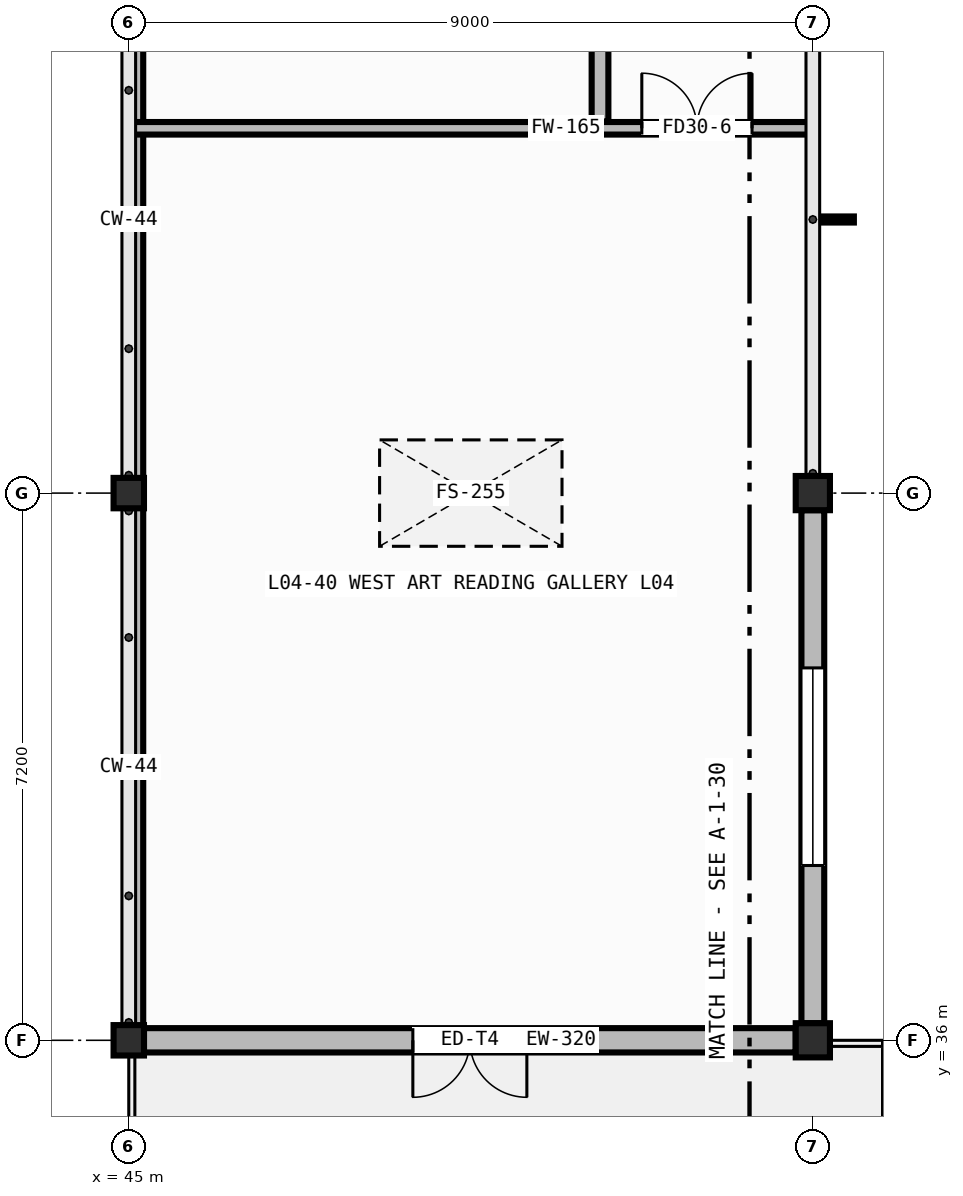
"""IFC4 building model, lengths in metres.
Left out: names, types, materials, properties, quantities, classifications, styles, units other than length and angle.
Written with IfcOpenShell. Run it as: python <this file> out.ifc"""

import sys

from ifc_helpers import new_model, si_unit, direction, frame, frame_2d, origin, origin_2d, place, context, subcontext, project, spatial, rectangle, hollow_rectangle, extrude, element, fill, save


model = new_model("IFC4")
c1 = context("Model", 3, precision=1e-05, world=origin(), true_north=direction((0.0, 1.0)))
c2 = subcontext(c1, "Body", "Model", "MODEL_VIEW")
j1 = project(units=[si_unit("LENGTHUNIT", "METRE"), si_unit("PLANEANGLEUNIT", "RADIAN")], contexts=[c1])
p1 = place(None, origin())
s1 = spatial("IfcSite", under=j1, at=p1, CompositionType="ELEMENT")
p2 = place(p1, origin())
s2 = spatial("IfcBuilding", under=s1, at=p2, CompositionType="ELEMENT")
p3 = place(p2, frame((0.0, 0.0, 12.8)))
s3 = spatial("IfcBuildingStorey", under=s2, at=p3, CompositionType="ELEMENT", Elevation=12.8)
for number, where, z_axis, x_axis in (
    (1, (45.0, 36.0, 0.0), (0.0, 0.0, 1.0), (1.0, 0.0, 0.0)),
    (2, (45.0, 43.2, 0.0), (0.0, 0.0, 1.0), (1.0, 0.0, 0.0)),
):
    element("IfcColumn", number, at=place(p3, frame(where, z_axis=z_axis, x_axis=x_axis)), inside=s3, PredefinedType="COLUMN", context=c2, shape_type="SweptSolid", body=[
        extrude(hollow_rectangle(XDim=0.4, YDim=0.4, WallThickness=0.016, at=origin_2d()), origin(), (0.0, 0.0, 1.0), 3.78),
    ])
for number, where, z_axis, x_axis in (
    (3, (54.0, 36.0, 0.0), (0.0, 0.0, 1.0), (1.0, 0.0, 0.0)),
    (4, (54.0, 43.2, 0.0), (0.0, 0.0, 1.0), (1.0, 0.0, 0.0)),
):
    element("IfcColumn", number, at=place(p3, frame(where, z_axis=z_axis, x_axis=x_axis)), inside=s3, PredefinedType="COLUMN", context=c2, shape_type="SweptSolid", body=[
        extrude(hollow_rectangle(XDim=0.45, YDim=0.45, WallThickness=0.019, at=origin_2d()), origin(), (0.0, 0.0, 1.0), 3.78),
    ])
p4 = place(p3, frame((45.2, 36.0, 0.0), z_axis=(0.0, 0.0, 1.0), x_axis=(1.0, 0.0, 0.0)))
e5 = element("IfcWall", 5, at=p4, inside=s3, PredefinedType="STANDARD", context=c2, shape_type="SweptSolid", body=[
    extrude(rectangle(XDim=8.575, YDim=0.32, at=frame_2d((4.288, 0.0))), origin(), (0.0, 0.0, 1.0), 3.33),
])
p5 = place(p4, frame((3.538, 0.0, 0.0)))
e6 = element("IfcOpeningElement", 6, at=p5, cuts=e5, PredefinedType="OPENING", context=c2, shape_type="SweptSolid", body=[
    extrude(rectangle(XDim=1.5, YDim=2.05, at=frame_2d((0.75, 1.025))), frame((0.0, 0.172, 0.0), z_axis=(0.0, -1.0, 0.0), x_axis=(1.0, 0.0, 0.0)), (0.0, 0.0, 1.0), 0.344),
])
p6 = place(p3, frame((54.0, 42.975, 0.0), z_axis=(0.0, 0.0, 1.0), x_axis=(0.0, -1.0, 0.0)))
e7 = element("IfcWall", 7, at=p6, inside=s3, PredefinedType="STANDARD", context=c2, shape_type="SweptSolid", body=[
    extrude(rectangle(XDim=6.75, YDim=0.3, at=frame_2d((3.375, 0.0))), origin(), (0.0, 0.0, 1.0), 3.33),
])
p7 = place(p6, frame((2.075, 0.0, 0.85)))
e8 = element("IfcOpeningElement", 8, at=p7, cuts=e7, PredefinedType="OPENING", context=c2, shape_type="SweptSolid", body=[
    extrude(rectangle(XDim=2.6, YDim=1.6, at=frame_2d((1.3, 0.8))), frame((0.0, 0.162, 0.0), z_axis=(0.0, -1.0, 0.0), x_axis=(1.0, 0.0, 0.0)), (0.0, 0.0, 1.0), 0.324),
])
p8 = place(p3, frame((45.095, 36.0, 4.0), z_axis=(0.0, 0.0, 1.0), x_axis=(0.0, 1.0, 0.0)))
e9 = element("IfcWall", 9, at=p8, inside=s3, PredefinedType="PARAPET", context=c2, shape_type="SweptSolid", body=[
    extrude(rectangle(XDim=28.8, YDim=0.19, at=frame_2d((14.4, 0.0))), origin(), (0.0, 0.0, 1.0), 0.75),
])
p9 = place(p3, frame((45.035, 48.0, 0.0), z_axis=(0.0, 0.0, 1.0), x_axis=(1.0, 0.0, 0.0)))
e10 = element("IfcWall", 10, at=p9, inside=s3, PredefinedType="PARTITIONING", context=c2, shape_type="SweptSolid", body=[
    extrude(rectangle(XDim=8.93, YDim=0.165, at=frame_2d((4.465, 0.0))), origin(), (0.0, 0.0, 1.0), 3.78),
])
p10 = place(p9, frame((6.715, 0.0, 0.0)))
e11 = element("IfcOpeningElement", 11, at=p10, cuts=e10, PredefinedType="OPENING", context=c2, shape_type="SweptSolid", body=[
    extrude(rectangle(XDim=1.45, YDim=2.1, at=frame_2d((0.725, 1.05))), frame((0.0, 0.094, 0.0), z_axis=(0.0, -1.0, 0.0), x_axis=(1.0, 0.0, 0.0)), (0.0, 0.0, 1.0), 0.189),
])
p11 = place(p3, frame((51.2, 48.09, 0.0), z_axis=(0.0, 0.0, 1.0), x_axis=(0.0, 1.0, 0.0)))
e12 = element("IfcWall", 12, at=p11, inside=s3, PredefinedType="PARTITIONING", context=c2, shape_type="SweptSolid", body=[
    extrude(rectangle(XDim=21.02, YDim=0.22, at=frame_2d((10.51, 0.0))), origin(), (0.0, 0.0, 1.0), 3.78),
])
p12 = place(p11, frame((5.11, 0.0, 0.0)))
e13 = element("IfcOpeningElement", 13, at=p12, cuts=e12, PredefinedType="OPENING", context=c2, shape_type="SweptSolid", body=[
    extrude(rectangle(XDim=1.6, YDim=2.12, at=frame_2d((0.8, 1.06))), frame((0.0, 0.122, 0.0), z_axis=(0.0, -1.0, 0.0), x_axis=(1.0, 0.0, 0.0)), (0.0, 0.0, 1.0), 0.244),
])
p13 = place(p5, frame((1.5, 0.0, 0.0), z_axis=(0.0, 0.0, 1.0), x_axis=(-1.0, 0.0, 0.0)))
e14 = element("IfcDoor", 14, at=p13, inside=s3, OperationType="DOUBLE_DOOR_SINGLE_SWING", PredefinedType="DOOR", context=c2, shape_type="SweptSolid", body=[
    extrude(rectangle(XDim=1.5, YDim=2.05, at=frame_2d((0.75, 1.025))), frame((0.0, 0.025, 0.0), z_axis=(0.0, -1.0, 0.0), x_axis=(1.0, 0.0, 0.0)), (0.0, 0.0, 1.0), 0.05),
])
fill(e6, e14)
p14 = place(p7, origin())
e15 = element("IfcWindow", 15, at=p14, inside=s3, PartitioningType="DOUBLE_PANEL_VERTICAL", PredefinedType="WINDOW", context=c2, shape_type="SweptSolid", body=[
    extrude(rectangle(XDim=2.6, YDim=1.6, at=frame_2d((1.3, 0.8))), frame((0.0, 0.03, 0.0), z_axis=(0.0, -1.0, 0.0), x_axis=(1.0, 0.0, 0.0)), (0.0, 0.0, 1.0), 0.06),
])
fill(e8, e15)
p15 = place(p3, frame((0.0, 0.0, 3.78)))
p16 = place(p15, frame((49.5, 43.2, 0.16)))
e16 = element("IfcWindow", 16, at=p16, inside=s3, PartitioningType="SINGLE_PANEL", PredefinedType="SKYLIGHT", context=c2, shape_type="SweptSolid", body=[
    extrude(rectangle(XDim=2.4, YDim=1.4, at=origin_2d()), origin(), (0.0, 0.0, 1.0), 0.06),
])
p17 = place(p10, origin())
e17 = element("IfcDoor", 17, at=p17, inside=s3, OperationType="DOUBLE_DOOR_SINGLE_SWING", PredefinedType="DOOR", context=c2, shape_type="SweptSolid", body=[
    extrude(rectangle(XDim=1.45, YDim=2.1, at=frame_2d((0.725, 1.05))), frame((0.0, 0.025, 0.0), z_axis=(0.0, -1.0, 0.0), x_axis=(1.0, 0.0, 0.0)), (0.0, 0.0, 1.0), 0.05),
])
fill(e11, e17)
save(model, sys.argv[1])
